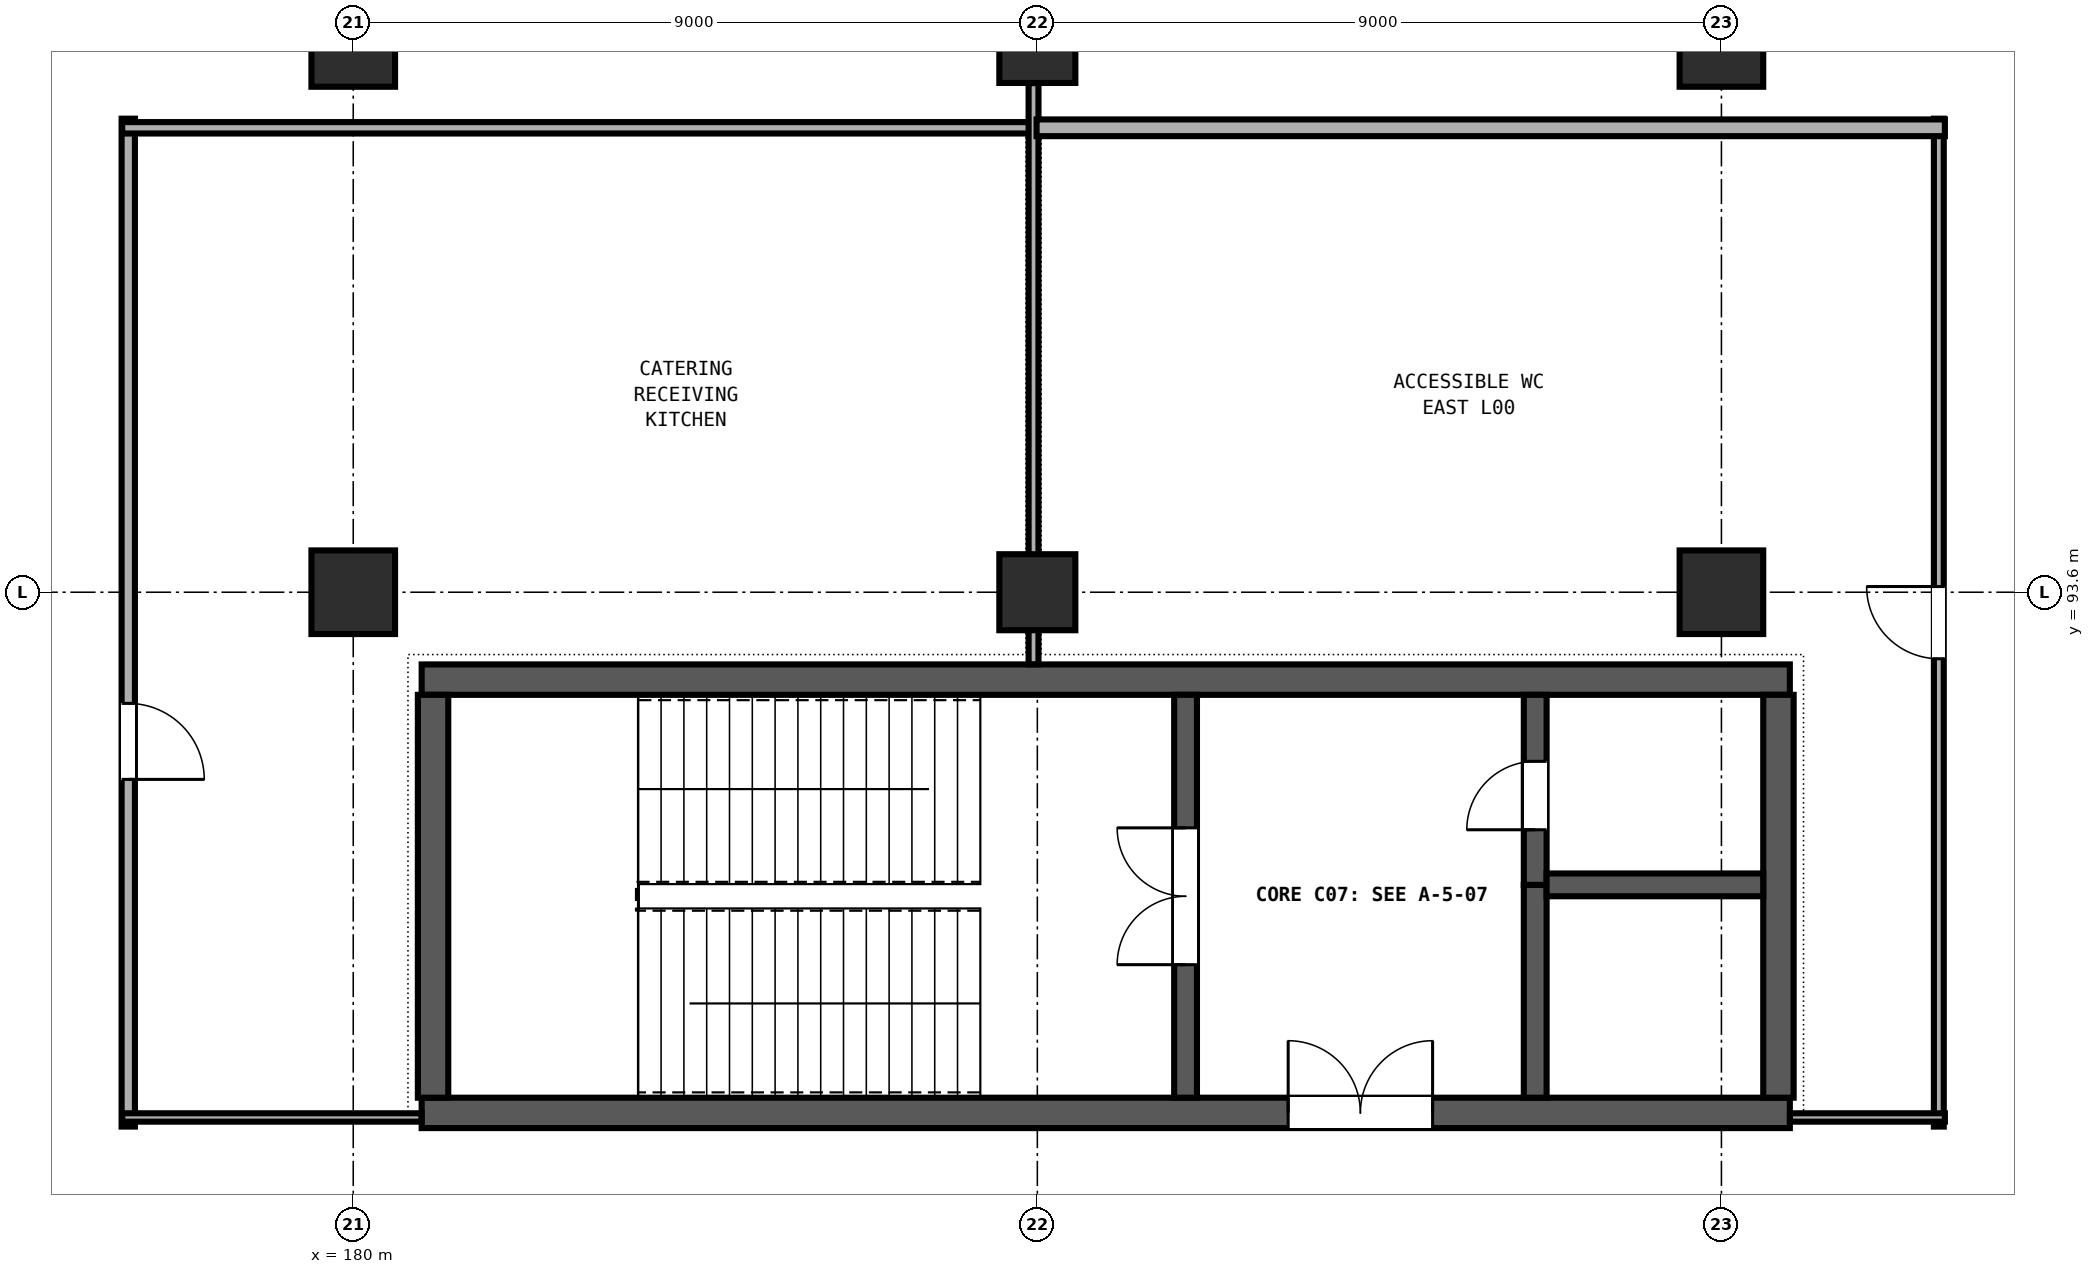
"""IFC4 building model, lengths in metres.
Left out: names, types, materials, properties, quantities, classifications, styles, units other than length and angle.
Written with IfcOpenShell. Run it as: python <this file> out.ifc"""

import sys

from ifc_helpers import new_model, si_unit, direction, frame, frame_2d, origin, origin_2d, place, context, subcontext, project, spatial, rectangle, extrude, element, fill, save


model = new_model("IFC4")
c1 = context("Model", 3, precision=1e-05, world=origin(), true_north=direction((0.0, 1.0)))
c2 = subcontext(c1, "Body", "Model", "MODEL_VIEW")
j1 = project(units=[si_unit("LENGTHUNIT", "METRE"), si_unit("PLANEANGLEUNIT", "RADIAN")], contexts=[c1])
p1 = place(None, origin())
s1 = spatial("IfcSite", under=j1, at=p1, CompositionType="ELEMENT")
p2 = place(p1, origin())
s2 = spatial("IfcBuilding", under=s1, at=p2, CompositionType="ELEMENT")
p3 = place(p2, origin())
s3 = spatial("IfcBuildingStorey", under=s2, at=p3, CompositionType="ELEMENT", Elevation=0.0)
for number, where, z_axis, x_axis in (
    (1, (180.0, 93.6, 0.0), (0.0, 0.0, 1.0), (1.0, 0.0, 0.0)),
    (2, (180.0, 100.8, 0.0), (0.0, 0.0, 1.0), (1.0, 0.0, 0.0)),
):
    element("IfcColumn", number, at=place(p3, frame(where, z_axis=z_axis, x_axis=x_axis)), inside=s3, PredefinedType="COLUMN", context=c2, shape_type="SweptSolid", body=[
        extrude(rectangle(XDim=1.1, YDim=1.1, at=origin_2d()), origin(), (0.0, 0.0, 1.0), 4.8),
    ])
for number, where, z_axis, x_axis in (
    (3, (189.0, 93.6, 0.0), (0.0, 0.0, 1.0), (1.0, 0.0, 0.0)),
    (4, (189.0, 100.8, 0.0), (0.0, 0.0, 1.0), (1.0, 0.0, 0.0)),
):
    element("IfcColumn", number, at=place(p3, frame(where, z_axis=z_axis, x_axis=x_axis)), inside=s3, PredefinedType="COLUMN", context=c2, shape_type="SweptSolid", body=[
        extrude(rectangle(XDim=1.0, YDim=1.0, at=origin_2d()), origin(), (0.0, 0.0, 1.0), 4.8),
    ])
for number, where, z_axis, x_axis in (
    (5, (198.0, 93.6, 0.0), (0.0, 0.0, 1.0), (1.0, 0.0, 0.0)),
    (6, (198.0, 100.8, 0.0), (0.0, 0.0, 1.0), (1.0, 0.0, 0.0)),
):
    element("IfcColumn", number, at=place(p3, frame(where, z_axis=z_axis, x_axis=x_axis)), inside=s3, PredefinedType="COLUMN", context=c2, shape_type="SweptSolid", body=[
        extrude(rectangle(XDim=1.1, YDim=1.1, at=origin_2d()), origin(), (0.0, 0.0, 1.0), 4.8),
    ])
p4 = place(p3, frame((180.9, 86.75, 0.0), z_axis=(0.0, 0.0, 1.0), x_axis=(1.0, 0.0, 0.0)))
e7 = element("IfcWall", 7, at=p4, inside=s3, PredefinedType="SHEAR", context=c2, shape_type="SweptSolid", body=[
    extrude(rectangle(XDim=18.0, YDim=0.4, at=frame_2d((9.0, 0.0))), origin(), (0.0, 0.0, 1.0), 4.5),
])
p5 = place(p4, frame((11.4, 0.0, 0.0)))
e8 = element("IfcOpeningElement", 8, at=p5, cuts=e7, PredefinedType="OPENING", context=c2, shape_type="SweptSolid", body=[
    extrude(rectangle(XDim=1.9, YDim=2.25, at=frame_2d((0.95, 1.125))), frame((0.0, 0.21, 0.0), z_axis=(0.0, -1.0, 0.0), x_axis=(1.0, 0.0, 0.0)), (0.0, 0.0, 1.0), 0.42),
])
p6 = place(p3, frame((198.9, 92.45, 0.0), z_axis=(0.0, 0.0, 1.0), x_axis=(-1.0, 0.0, 0.0)))
e9 = element("IfcWall", 9, at=p6, inside=s3, PredefinedType="SHEAR", context=c2, shape_type="SweptSolid", body=[
    extrude(rectangle(XDim=18.0, YDim=0.4, at=frame_2d((9.0, 0.0))), origin(), (0.0, 0.0, 1.0), 4.5),
])
for number, where, z_axis, x_axis in (
    (10, (181.05, 92.25, 0.0), (0.0, 0.0, 1.0), (0.0, -1.0, 0.0)),
    (11, (198.75, 86.95, 0.0), (0.0, 0.0, 1.0), (0.0, 1.0, 0.0)),
):
    element("IfcWall", number, at=place(p3, frame(where, z_axis=z_axis, x_axis=x_axis)), inside=s3, PredefinedType="SHEAR", context=c2, shape_type="SweptSolid", body=[
        extrude(rectangle(XDim=5.3, YDim=0.4, at=frame_2d((2.65, 0.0))), origin(), (0.0, 0.0, 1.0), 4.5),
    ])
p7 = place(p3, frame((190.95, 86.95, 0.0), z_axis=(0.0, 0.0, 1.0), x_axis=(0.0, 1.0, 0.0)))
e12 = element("IfcWall", 12, at=p7, inside=s3, PredefinedType="SHEAR", context=c2, shape_type="SweptSolid", body=[
    extrude(rectangle(XDim=5.3, YDim=0.3, at=frame_2d((2.65, 0.0))), origin(), (0.0, 0.0, 1.0), 4.5),
])
p8 = place(p7, frame((1.75, 0.0, 0.0)))
e13 = element("IfcOpeningElement", 13, at=p8, cuts=e12, PredefinedType="OPENING", context=c2, shape_type="SweptSolid", body=[
    extrude(rectangle(XDim=1.8, YDim=2.25, at=frame_2d((0.9, 1.125))), frame((0.0, 0.16, 0.0), z_axis=(0.0, -1.0, 0.0), x_axis=(1.0, 0.0, 0.0)), (0.0, 0.0, 1.0), 0.32),
])
p9 = place(p3, frame((195.55, 86.95, 0.0), z_axis=(0.0, 0.0, 1.0), x_axis=(0.0, 1.0, 0.0)))
e14 = element("IfcWall", 14, at=p9, inside=s3, PredefinedType="SHEAR", context=c2, shape_type="SweptSolid", body=[
    extrude(rectangle(XDim=2.8, YDim=0.3, at=frame_2d((1.4, 0.0))), origin(), (0.0, 0.0, 1.0), 4.5),
])
p10 = place(p3, frame((195.55, 89.75, 0.0), z_axis=(0.0, 0.0, 1.0), x_axis=(0.0, 1.0, 0.0)))
e15 = element("IfcWall", 15, at=p10, inside=s3, PredefinedType="SHEAR", context=c2, shape_type="SweptSolid", body=[
    extrude(rectangle(XDim=2.5, YDim=0.3, at=frame_2d((1.25, 0.0))), origin(), (0.0, 0.0, 1.0), 4.5),
])
p11 = place(p10, frame((0.725, 0.0, 0.0)))
e16 = element("IfcOpeningElement", 16, at=p11, cuts=e15, PredefinedType="OPENING", context=c2, shape_type="SweptSolid", body=[
    extrude(rectangle(XDim=0.9, YDim=2.1, at=frame_2d((0.45, 1.05))), frame((0.0, 0.16, 0.0), z_axis=(0.0, -1.0, 0.0), x_axis=(1.0, 0.0, 0.0)), (0.0, 0.0, 1.0), 0.32),
])
p12 = place(p3, frame((195.7, 89.75, 0.0), z_axis=(0.0, 0.0, 1.0), x_axis=(1.0, 0.0, 0.0)))
e17 = element("IfcWall", 17, at=p12, inside=s3, PredefinedType="SHEAR", context=c2, shape_type="SweptSolid", body=[
    extrude(rectangle(XDim=2.85, YDim=0.3, at=frame_2d((1.425, 0.0))), origin(), (0.0, 0.0, 1.0), 4.5),
])
p13 = place(p3, frame((177.04, 99.83, 0.0), z_axis=(0.0, 0.0, 1.0), x_axis=(0.0, -1.0, 0.0)))
e18 = element("IfcWall", 18, at=p13, inside=s3, PredefinedType="PARTITIONING", context=c2, shape_type="SweptSolid", body=[
    extrude(rectangle(XDim=13.26, YDim=0.175, at=frame_2d((6.63, 0.0))), origin(), (0.0, 0.0, 1.0), 3.28),
])
p14 = place(p13, frame((7.692, 0.0, 0.0)))
e19 = element("IfcOpeningElement", 19, at=p14, cuts=e18, PredefinedType="OPENING", context=c2, shape_type="SweptSolid", body=[
    extrude(rectangle(XDim=1.0, YDim=2.1, at=frame_2d((0.5, 1.05))), frame((0.0, 0.097, 0.0), z_axis=(0.0, -1.0, 0.0), x_axis=(1.0, 0.0, 0.0)), (0.0, 0.0, 1.0), 0.195),
])
p15 = place(p3, frame((176.96, 99.71, 0.0), z_axis=(0.0, 0.0, 1.0), x_axis=(1.0, 0.0, 0.0)))
e20 = element("IfcWall", 20, at=p15, inside=s3, PredefinedType="PARTITIONING", context=c2, shape_type="SweptSolid", body=[
    extrude(rectangle(XDim=11.95, YDim=0.15, at=frame_2d((5.975, 0.0))), origin(), (0.0, 0.0, 1.0), 3.28),
])
p16 = place(p3, frame((188.95, 100.298, 0.0), z_axis=(0.0, 0.0, 1.0), x_axis=(0.0, -1.0, 0.0)))
e21 = element("IfcWall", 21, at=p16, inside=s3, PredefinedType="PARTITIONING", context=c2, shape_type="SweptSolid", body=[
    extrude(rectangle(XDim=7.646, YDim=0.13, at=frame_2d((3.823, 0.0))), origin(), (0.0, 0.0, 1.0), 3.28),
])
p17 = place(p3, frame((180.898, 86.69, 0.0), z_axis=(0.0, 0.0, 1.0), x_axis=(-1.0, 0.0, 0.0)))
e22 = element("IfcWall", 22, at=p17, inside=s3, PredefinedType="PARTITIONING", context=c2, shape_type="SweptSolid", body=[
    extrude(rectangle(XDim=3.938, YDim=0.11, at=frame_2d((1.969, 0.0))), origin(), (0.0, 0.0, 1.0), 3.28),
])
p18 = place(p3, frame((200.86, 86.57, 0.0), z_axis=(0.0, 0.0, 1.0), x_axis=(0.0, 1.0, 0.0)))
e23 = element("IfcWall", 23, at=p18, inside=s3, PredefinedType="PARTITIONING", context=c2, shape_type="SweptSolid", body=[
    extrude(rectangle(XDim=13.26, YDim=0.13, at=frame_2d((6.63, 0.0))), origin(), (0.0, 0.0, 1.0), 3.28),
])
p19 = place(p18, frame((6.155, 0.0, 0.0)))
e24 = element("IfcOpeningElement", 24, at=p19, cuts=e23, PredefinedType="OPENING", context=c2, shape_type="SweptSolid", body=[
    extrude(rectangle(XDim=0.95, YDim=2.18, at=frame_2d((0.475, 1.09))), frame((0.0, 0.075, 0.0), z_axis=(0.0, -1.0, 0.0), x_axis=(1.0, 0.0, 0.0)), (0.0, 0.0, 1.0), 0.15),
])
p20 = place(p3, frame((200.94, 86.69, 0.0), z_axis=(0.0, 0.0, 1.0), x_axis=(-1.0, 0.0, 0.0)))
e25 = element("IfcWall", 25, at=p20, inside=s3, PredefinedType="PARTITIONING", context=c2, shape_type="SweptSolid", body=[
    extrude(rectangle(XDim=2.038, YDim=0.11, at=frame_2d((1.019, 0.0))), origin(), (0.0, 0.0, 1.0), 3.28),
])
p21 = place(p3, frame((188.99, 99.71, 0.0), z_axis=(0.0, 0.0, 1.0), x_axis=(1.0, 0.0, 0.0)))
e26 = element("IfcWall", 26, at=p21, inside=s3, PredefinedType="PARTITIONING", context=c2, shape_type="SweptSolid", body=[
    extrude(rectangle(XDim=11.95, YDim=0.22, at=frame_2d((5.975, 0.0))), origin(), (0.0, 0.0, 1.0), 3.28),
])
p22 = place(p8, origin())
e27 = element("IfcDoor", 27, at=p22, inside=s3, OperationType="DOUBLE_DOOR_SINGLE_SWING", PredefinedType="DOOR", context=c2, shape_type="SweptSolid", body=[
    extrude(rectangle(XDim=1.8, YDim=2.25, at=frame_2d((0.9, 1.125))), frame((0.0, 0.025, 0.0), z_axis=(0.0, -1.0, 0.0), x_axis=(1.0, 0.0, 0.0)), (0.0, 0.0, 1.0), 0.05),
])
fill(e13, e27)
p23 = place(p11, origin())
e28 = element("IfcDoor", 28, at=p23, inside=s3, OperationType="SINGLE_SWING_LEFT", PredefinedType="DOOR", context=c2, shape_type="SweptSolid", body=[
    extrude(rectangle(XDim=0.9, YDim=2.1, at=frame_2d((0.45, 1.05))), frame((0.0, 0.025, 0.0), z_axis=(0.0, -1.0, 0.0), x_axis=(1.0, 0.0, 0.0)), (0.0, 0.0, 1.0), 0.05),
])
fill(e16, e28)
p24 = place(p5, origin())
e29 = element("IfcDoor", 29, at=p24, inside=s3, OperationType="DOUBLE_DOOR_SINGLE_SWING", PredefinedType="DOOR", context=c2, shape_type="SweptSolid", body=[
    extrude(rectangle(XDim=1.9, YDim=2.25, at=frame_2d((0.95, 1.125))), frame((0.0, 0.025, 0.0), z_axis=(0.0, -1.0, 0.0), x_axis=(1.0, 0.0, 0.0)), (0.0, 0.0, 1.0), 0.05),
])
fill(e8, e29)
p25 = place(p14, origin())
e30 = element("IfcDoor", 30, at=p25, inside=s3, OperationType="SINGLE_SWING_RIGHT", PredefinedType="DOOR", context=c2, shape_type="SweptSolid", body=[
    extrude(rectangle(XDim=1.0, YDim=2.1, at=frame_2d((0.5, 1.05))), frame((0.0, 0.025, 0.0), z_axis=(0.0, -1.0, 0.0), x_axis=(1.0, 0.0, 0.0)), (0.0, 0.0, 1.0), 0.05),
])
fill(e19, e30)
p26 = place(p19, origin())
e31 = element("IfcDoor", 31, at=p26, inside=s3, OperationType="SINGLE_SWING_RIGHT", PredefinedType="DOOR", context=c2, shape_type="SweptSolid", body=[
    extrude(rectangle(XDim=0.95, YDim=2.18, at=frame_2d((0.475, 1.09))), frame((0.0, 0.025, 0.0), z_axis=(0.0, -1.0, 0.0), x_axis=(1.0, 0.0, 0.0)), (0.0, 0.0, 1.0), 0.05),
])
fill(e24, e31)
save(model, sys.argv[1])
